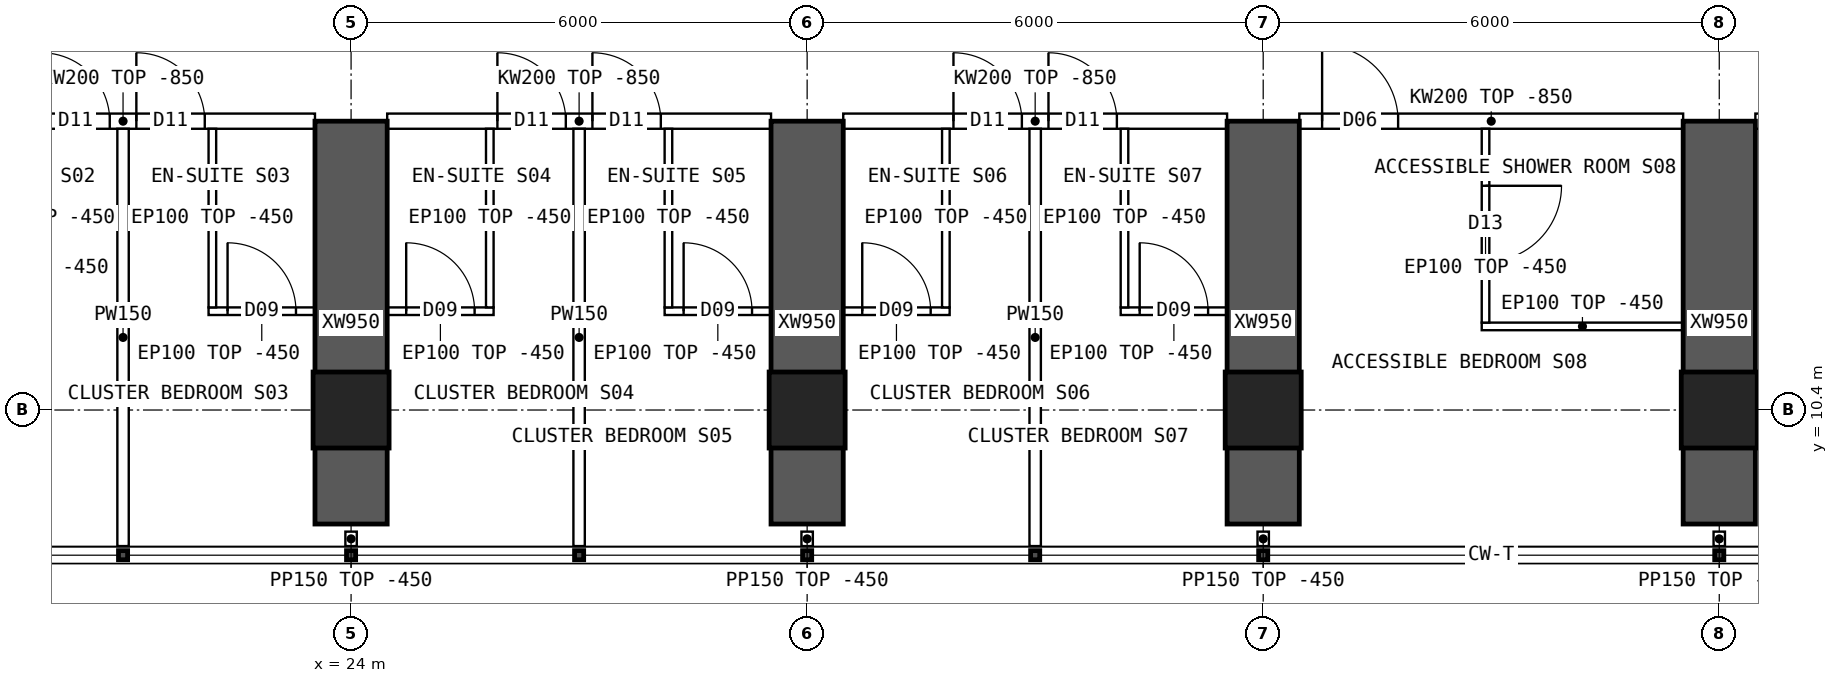
"""IFC4 building model, lengths in metres.
Left out: names, types, materials, properties, quantities, classifications, styles, units other than length and angle.
Written with IfcOpenShell. Run it as: python <this file> out.ifc"""

import sys

from ifc_helpers import new_model, si_unit, direction, frame, frame_2d, origin, origin_2d, place, context, subcontext, project, spatial, polyline, rectangle, hollow_rectangle, outline, extrude, element, fill, save


model = new_model("IFC4")
c1 = context("Model", 3, precision=1e-05, world=origin(), true_north=direction((0.0, 1.0)))
c2 = subcontext(c1, "Body", "Model", "MODEL_VIEW")
j1 = project(units=[si_unit("LENGTHUNIT", "METRE"), si_unit("PLANEANGLEUNIT", "RADIAN")], contexts=[c1])
p1 = place(None, origin())
s1 = spatial("IfcSite", under=j1, at=p1, CompositionType="ELEMENT")
p2 = place(p1, origin())
s2 = spatial("IfcBuilding", under=s1, at=p2, CompositionType="ELEMENT")
p3 = place(p2, frame((0.0, 0.0, 80.65)))
s3 = spatial("IfcBuildingStorey", under=s2, at=p3, CompositionType="ELEMENT", Elevation=80.65)
for number, where, z_axis, x_axis in (
    (1, (24.0, 10.4, 0.0), (0.0, 0.0, 1.0), (1.0, 0.0, 0.0)),
    (2, (30.0, 10.4, 0.0), (0.0, 0.0, 1.0), (1.0, 0.0, 0.0)),
    (3, (36.0, 10.4, 0.0), (0.0, 0.0, 1.0), (1.0, 0.0, 0.0)),
    (4, (42.0, 10.4, 0.0), (0.0, 0.0, 1.0), (1.0, 0.0, 0.0)),
):
    element("IfcColumn", number, at=place(p3, frame(where, z_axis=z_axis, x_axis=x_axis)), inside=s3, PredefinedType="COLUMN", context=c2, shape_type="SweptSolid", body=[
        extrude(hollow_rectangle(XDim=1.0, YDim=1.0, WallThickness=0.1, at=origin_2d()), origin(), (0.0, 0.0, 1.0), 3.75),
    ])
for number, where, z_axis, x_axis in (
    (5, (24.0, 8.9, 0.0), (0.0, 0.0, 1.0), (0.0, 1.0, 0.0)),
    (6, (30.0, 8.9, 0.0), (0.0, 0.0, 1.0), (0.0, 1.0, 0.0)),
    (7, (36.0, 8.9, 0.0), (0.0, 0.0, 1.0), (0.0, 1.0, 0.0)),
    (8, (42.0, 8.9, 0.0), (0.0, 0.0, 1.0), (0.0, 1.0, 0.0)),
):
    element("IfcWall", number, at=place(p3, frame(where, z_axis=z_axis, x_axis=x_axis)), inside=s3, PredefinedType="SHEAR", context=c2, shape_type="SweptSolid", body=[
        extrude(rectangle(XDim=5.3, YDim=0.95, at=frame_2d((2.65, 0.0))), origin(), (0.0, 0.0, 1.0), 3.75),
    ])
p4 = place(p3, frame((18.475, 14.2, 0.0), z_axis=(0.0, 0.0, 1.0), x_axis=(1.0, 0.0, 0.0)))
e9 = element("IfcWall", 9, at=p4, inside=s3, PredefinedType="SOLIDWALL", context=c2, shape_type="SweptSolid", body=[
    extrude(outline(polyline([(0.0, 0.0), (5.05, 0.0), (5.05, 2.9), (0.0, 2.9), (0.0, 0.0)])), frame((0.0, 0.1, 0.0), z_axis=(0.0, -1.0, 0.0), x_axis=(1.0, 0.0, 0.0)), (0.0, 0.0, 1.0), 0.2),
])
p5 = place(p4, frame((1.45, 0.0, 0.0)))
e10 = element("IfcOpeningElement", 10, at=p5, cuts=e9, PredefinedType="OPENING", context=c2, shape_type="SweptSolid", body=[
    extrude(rectangle(XDim=0.9, YDim=2.1, at=frame_2d((0.45, 1.05))), frame((0.0, 0.11, 0.0), z_axis=(0.0, -1.0, 0.0), x_axis=(1.0, 0.0, 0.0)), (0.0, 0.0, 1.0), 0.22),
])
p6 = place(p4, frame((2.7, 0.0, 0.0)))
e11 = element("IfcOpeningElement", 11, at=p6, cuts=e9, PredefinedType="OPENING", context=c2, shape_type="SweptSolid", body=[
    extrude(rectangle(XDim=0.9, YDim=2.1, at=frame_2d((0.45, 1.05))), frame((0.0, 0.11, 0.0), z_axis=(0.0, -1.0, 0.0), x_axis=(1.0, 0.0, 0.0)), (0.0, 0.0, 1.0), 0.22),
])
p7 = place(p3, frame((24.475, 14.2, 0.0), z_axis=(0.0, 0.0, 1.0), x_axis=(1.0, 0.0, 0.0)))
e12 = element("IfcWall", 12, at=p7, inside=s3, PredefinedType="SOLIDWALL", context=c2, shape_type="SweptSolid", body=[
    extrude(outline(polyline([(0.0, 0.0), (5.05, 0.0), (5.05, 2.9), (0.0, 2.9), (0.0, 0.0)])), frame((0.0, 0.1, 0.0), z_axis=(0.0, -1.0, 0.0), x_axis=(1.0, 0.0, 0.0)), (0.0, 0.0, 1.0), 0.2),
])
p8 = place(p7, frame((1.45, 0.0, 0.0)))
e13 = element("IfcOpeningElement", 13, at=p8, cuts=e12, PredefinedType="OPENING", context=c2, shape_type="SweptSolid", body=[
    extrude(rectangle(XDim=0.9, YDim=2.1, at=frame_2d((0.45, 1.05))), frame((0.0, 0.11, 0.0), z_axis=(0.0, -1.0, 0.0), x_axis=(1.0, 0.0, 0.0)), (0.0, 0.0, 1.0), 0.22),
])
p9 = place(p7, frame((2.7, 0.0, 0.0)))
e14 = element("IfcOpeningElement", 14, at=p9, cuts=e12, PredefinedType="OPENING", context=c2, shape_type="SweptSolid", body=[
    extrude(rectangle(XDim=0.9, YDim=2.1, at=frame_2d((0.45, 1.05))), frame((0.0, 0.11, 0.0), z_axis=(0.0, -1.0, 0.0), x_axis=(1.0, 0.0, 0.0)), (0.0, 0.0, 1.0), 0.22),
])
p10 = place(p3, frame((30.475, 14.2, 0.0), z_axis=(0.0, 0.0, 1.0), x_axis=(1.0, 0.0, 0.0)))
e15 = element("IfcWall", 15, at=p10, inside=s3, PredefinedType="SOLIDWALL", context=c2, shape_type="SweptSolid", body=[
    extrude(outline(polyline([(0.0, 0.0), (5.05, 0.0), (5.05, 2.9), (0.0, 2.9), (0.0, 0.0)])), frame((0.0, 0.1, 0.0), z_axis=(0.0, -1.0, 0.0), x_axis=(1.0, 0.0, 0.0)), (0.0, 0.0, 1.0), 0.2),
])
p11 = place(p10, frame((1.45, 0.0, 0.0)))
e16 = element("IfcOpeningElement", 16, at=p11, cuts=e15, PredefinedType="OPENING", context=c2, shape_type="SweptSolid", body=[
    extrude(rectangle(XDim=0.9, YDim=2.1, at=frame_2d((0.45, 1.05))), frame((0.0, 0.11, 0.0), z_axis=(0.0, -1.0, 0.0), x_axis=(1.0, 0.0, 0.0)), (0.0, 0.0, 1.0), 0.22),
])
p12 = place(p10, frame((2.7, 0.0, 0.0)))
e17 = element("IfcOpeningElement", 17, at=p12, cuts=e15, PredefinedType="OPENING", context=c2, shape_type="SweptSolid", body=[
    extrude(rectangle(XDim=0.9, YDim=2.1, at=frame_2d((0.45, 1.05))), frame((0.0, 0.11, 0.0), z_axis=(0.0, -1.0, 0.0), x_axis=(1.0, 0.0, 0.0)), (0.0, 0.0, 1.0), 0.22),
])
p13 = place(p3, frame((36.475, 14.2, 0.0), z_axis=(0.0, 0.0, 1.0), x_axis=(1.0, 0.0, 0.0)))
e18 = element("IfcWall", 18, at=p13, inside=s3, PredefinedType="SOLIDWALL", context=c2, shape_type="SweptSolid", body=[
    extrude(outline(polyline([(0.0, 0.0), (5.05, 0.0), (5.05, 2.9), (0.0, 2.9), (0.0, 0.0)])), frame((0.0, 0.1, 0.0), z_axis=(0.0, -1.0, 0.0), x_axis=(1.0, 0.0, 0.0)), (0.0, 0.0, 1.0), 0.2),
])
p14 = place(p13, frame((0.3, 0.0, 0.0)))
e19 = element("IfcOpeningElement", 19, at=p14, cuts=e18, PredefinedType="OPENING", context=c2, shape_type="SweptSolid", body=[
    extrude(rectangle(XDim=1.0, YDim=2.1, at=frame_2d((0.5, 1.05))), frame((0.0, 0.11, 0.0), z_axis=(0.0, -1.0, 0.0), x_axis=(1.0, 0.0, 0.0)), (0.0, 0.0, 1.0), 0.22),
])
p15 = place(p3, frame((42.475, 14.2, 0.0), z_axis=(0.0, 0.0, 1.0), x_axis=(1.0, 0.0, 0.0)))
e20 = element("IfcWall", 20, at=p15, inside=s3, PredefinedType="SOLIDWALL", context=c2, shape_type="SweptSolid", body=[
    extrude(outline(polyline([(0.0, 0.0), (5.05, 0.0), (5.05, 2.9), (0.0, 2.9), (0.0, 0.0)])), frame((0.0, 0.1, 0.0), z_axis=(0.0, -1.0, 0.0), x_axis=(1.0, 0.0, 0.0)), (0.0, 0.0, 1.0), 0.2),
])
p16 = place(p15, frame((0.6, 0.0, 0.0)))
e21 = element("IfcOpeningElement", 21, at=p16, cuts=e20, PredefinedType="OPENING", context=c2, shape_type="SweptSolid", body=[
    extrude(rectangle(XDim=1.0, YDim=2.1, at=frame_2d((0.5, 1.05))), frame((0.0, 0.11, 0.0), z_axis=(0.0, -1.0, 0.0), x_axis=(1.0, 0.0, 0.0)), (0.0, 0.0, 1.0), 0.22),
])
p17 = place(p3, frame((21.0, 8.61, 0.0), z_axis=(0.0, 0.0, 1.0), x_axis=(0.0, 1.0, 0.0)))
e22 = element("IfcWall", 22, at=p17, inside=s3, PredefinedType="PARTITIONING", context=c2, shape_type="SweptSolid", body=[
    extrude(outline(polyline([(0.0, 0.0), (5.49, 0.0), (5.49, 2.9), (5.442, 2.9), (5.44, 3.3), (1.992, 3.3), (1.99, 2.9), (1.592, 2.9), (1.59, 3.3), (0.0, 3.3), (0.0, 0.0)])), frame((0.0, 0.075, 0.0), z_axis=(0.0, -1.0, 0.0), x_axis=(1.0, 0.0, 0.0)), (0.0, 0.0, 1.0), 0.15),
])
p18 = place(p3, frame((23.525, 11.7, 0.0), z_axis=(0.0, 0.0, 1.0), x_axis=(-1.0, 0.0, 0.0)))
e23 = element("IfcWall", 23, at=p18, inside=s3, PredefinedType="PARTITIONING", context=c2, shape_type="SweptSolid", body=[
    extrude(rectangle(XDim=1.4, YDim=0.1, at=frame_2d((0.7, 0.0))), origin(), (0.0, 0.0, 1.0), 3.3),
])
p19 = place(p18, frame((0.25, 0.0, 0.0)))
e24 = element("IfcOpeningElement", 24, at=p19, cuts=e23, PredefinedType="OPENING", context=c2, shape_type="SweptSolid", body=[
    extrude(rectangle(XDim=0.9, YDim=2.1, at=frame_2d((0.45, 1.05))), frame((0.0, 0.06, 0.0), z_axis=(0.0, -1.0, 0.0), x_axis=(1.0, 0.0, 0.0)), (0.0, 0.0, 1.0), 0.12),
])
p20 = place(p3, frame((22.175, 11.75, 0.0), z_axis=(0.0, 0.0, 1.0), x_axis=(0.0, 1.0, 0.0)))
e25 = element("IfcWall", 25, at=p20, inside=s3, PredefinedType="PARTITIONING", context=c2, shape_type="SweptSolid", body=[
    extrude(outline(polyline([(0.0, 0.0), (2.35, 0.0), (2.35, 2.9), (2.302, 2.9), (2.3, 3.3), (0.0, 3.3), (0.0, 0.0)])), frame((0.0, 0.05, 0.0), z_axis=(0.0, -1.0, 0.0), x_axis=(1.0, 0.0, 0.0)), (0.0, 0.0, 1.0), 0.1),
])
p21 = place(p3, frame((27.0, 8.61, 0.0), z_axis=(0.0, 0.0, 1.0), x_axis=(0.0, 1.0, 0.0)))
e26 = element("IfcWall", 26, at=p21, inside=s3, PredefinedType="PARTITIONING", context=c2, shape_type="SweptSolid", body=[
    extrude(outline(polyline([(0.0, 0.0), (5.49, 0.0), (5.49, 2.9), (5.442, 2.9), (5.44, 3.3), (1.992, 3.3), (1.99, 2.9), (1.592, 2.9), (1.59, 3.3), (0.0, 3.3), (0.0, 0.0)])), frame((0.0, 0.075, 0.0), z_axis=(0.0, -1.0, 0.0), x_axis=(1.0, 0.0, 0.0)), (0.0, 0.0, 1.0), 0.15),
])
p22 = place(p3, frame((25.875, 11.7, 0.0), z_axis=(0.0, 0.0, 1.0), x_axis=(-1.0, 0.0, 0.0)))
e27 = element("IfcWall", 27, at=p22, inside=s3, PredefinedType="PARTITIONING", context=c2, shape_type="SweptSolid", body=[
    extrude(rectangle(XDim=1.4, YDim=0.1, at=frame_2d((0.7, 0.0))), origin(), (0.0, 0.0, 1.0), 3.3),
])
p23 = place(p22, frame((0.25, 0.0, 0.0)))
e28 = element("IfcOpeningElement", 28, at=p23, cuts=e27, PredefinedType="OPENING", context=c2, shape_type="SweptSolid", body=[
    extrude(rectangle(XDim=0.9, YDim=2.1, at=frame_2d((0.45, 1.05))), frame((0.0, 0.06, 0.0), z_axis=(0.0, -1.0, 0.0), x_axis=(1.0, 0.0, 0.0)), (0.0, 0.0, 1.0), 0.12),
])
p24 = place(p3, frame((25.825, 11.75, 0.0), z_axis=(0.0, 0.0, 1.0), x_axis=(0.0, 1.0, 0.0)))
e29 = element("IfcWall", 29, at=p24, inside=s3, PredefinedType="PARTITIONING", context=c2, shape_type="SweptSolid", body=[
    extrude(outline(polyline([(0.0, 0.0), (2.35, 0.0), (2.35, 2.9), (2.302, 2.9), (2.3, 3.3), (0.0, 3.3), (0.0, 0.0)])), frame((0.0, 0.05, 0.0), z_axis=(0.0, -1.0, 0.0), x_axis=(1.0, 0.0, 0.0)), (0.0, 0.0, 1.0), 0.1),
])
p25 = place(p3, frame((29.525, 11.7, 0.0), z_axis=(0.0, 0.0, 1.0), x_axis=(-1.0, 0.0, 0.0)))
e30 = element("IfcWall", 30, at=p25, inside=s3, PredefinedType="PARTITIONING", context=c2, shape_type="SweptSolid", body=[
    extrude(rectangle(XDim=1.4, YDim=0.1, at=frame_2d((0.7, 0.0))), origin(), (0.0, 0.0, 1.0), 3.3),
])
p26 = place(p25, frame((0.25, 0.0, 0.0)))
e31 = element("IfcOpeningElement", 31, at=p26, cuts=e30, PredefinedType="OPENING", context=c2, shape_type="SweptSolid", body=[
    extrude(rectangle(XDim=0.9, YDim=2.1, at=frame_2d((0.45, 1.05))), frame((0.0, 0.06, 0.0), z_axis=(0.0, -1.0, 0.0), x_axis=(1.0, 0.0, 0.0)), (0.0, 0.0, 1.0), 0.12),
])
p27 = place(p3, frame((28.175, 11.75, 0.0), z_axis=(0.0, 0.0, 1.0), x_axis=(0.0, 1.0, 0.0)))
e32 = element("IfcWall", 32, at=p27, inside=s3, PredefinedType="PARTITIONING", context=c2, shape_type="SweptSolid", body=[
    extrude(outline(polyline([(0.0, 0.0), (2.35, 0.0), (2.35, 2.9), (2.302, 2.9), (2.3, 3.3), (0.0, 3.3), (0.0, 0.0)])), frame((0.0, 0.05, 0.0), z_axis=(0.0, -1.0, 0.0), x_axis=(1.0, 0.0, 0.0)), (0.0, 0.0, 1.0), 0.1),
])
p28 = place(p3, frame((33.0, 8.61, 0.0), z_axis=(0.0, 0.0, 1.0), x_axis=(0.0, 1.0, 0.0)))
e33 = element("IfcWall", 33, at=p28, inside=s3, PredefinedType="PARTITIONING", context=c2, shape_type="SweptSolid", body=[
    extrude(outline(polyline([(0.0, 0.0), (5.49, 0.0), (5.49, 2.9), (5.442, 2.9), (5.44, 3.3), (1.992, 3.3), (1.99, 2.9), (1.592, 2.9), (1.59, 3.3), (0.0, 3.3), (0.0, 0.0)])), frame((0.0, 0.075, 0.0), z_axis=(0.0, -1.0, 0.0), x_axis=(1.0, 0.0, 0.0)), (0.0, 0.0, 1.0), 0.15),
])
p29 = place(p3, frame((31.875, 11.7, 0.0), z_axis=(0.0, 0.0, 1.0), x_axis=(-1.0, 0.0, 0.0)))
e34 = element("IfcWall", 34, at=p29, inside=s3, PredefinedType="PARTITIONING", context=c2, shape_type="SweptSolid", body=[
    extrude(rectangle(XDim=1.4, YDim=0.1, at=frame_2d((0.7, 0.0))), origin(), (0.0, 0.0, 1.0), 3.3),
])
p30 = place(p29, frame((0.25, 0.0, 0.0)))
e35 = element("IfcOpeningElement", 35, at=p30, cuts=e34, PredefinedType="OPENING", context=c2, shape_type="SweptSolid", body=[
    extrude(rectangle(XDim=0.9, YDim=2.1, at=frame_2d((0.45, 1.05))), frame((0.0, 0.06, 0.0), z_axis=(0.0, -1.0, 0.0), x_axis=(1.0, 0.0, 0.0)), (0.0, 0.0, 1.0), 0.12),
])
p31 = place(p3, frame((31.825, 11.75, 0.0), z_axis=(0.0, 0.0, 1.0), x_axis=(0.0, 1.0, 0.0)))
e36 = element("IfcWall", 36, at=p31, inside=s3, PredefinedType="PARTITIONING", context=c2, shape_type="SweptSolid", body=[
    extrude(outline(polyline([(0.0, 0.0), (2.35, 0.0), (2.35, 2.9), (2.302, 2.9), (2.3, 3.3), (0.0, 3.3), (0.0, 0.0)])), frame((0.0, 0.05, 0.0), z_axis=(0.0, -1.0, 0.0), x_axis=(1.0, 0.0, 0.0)), (0.0, 0.0, 1.0), 0.1),
])
p32 = place(p3, frame((35.525, 11.7, 0.0), z_axis=(0.0, 0.0, 1.0), x_axis=(-1.0, 0.0, 0.0)))
e37 = element("IfcWall", 37, at=p32, inside=s3, PredefinedType="PARTITIONING", context=c2, shape_type="SweptSolid", body=[
    extrude(rectangle(XDim=1.4, YDim=0.1, at=frame_2d((0.7, 0.0))), origin(), (0.0, 0.0, 1.0), 3.3),
])
p33 = place(p32, frame((0.25, 0.0, 0.0)))
e38 = element("IfcOpeningElement", 38, at=p33, cuts=e37, PredefinedType="OPENING", context=c2, shape_type="SweptSolid", body=[
    extrude(rectangle(XDim=0.9, YDim=2.1, at=frame_2d((0.45, 1.05))), frame((0.0, 0.06, 0.0), z_axis=(0.0, -1.0, 0.0), x_axis=(1.0, 0.0, 0.0)), (0.0, 0.0, 1.0), 0.12),
])
p34 = place(p3, frame((34.175, 11.75, 0.0), z_axis=(0.0, 0.0, 1.0), x_axis=(0.0, 1.0, 0.0)))
e39 = element("IfcWall", 39, at=p34, inside=s3, PredefinedType="PARTITIONING", context=c2, shape_type="SweptSolid", body=[
    extrude(outline(polyline([(0.0, 0.0), (2.35, 0.0), (2.35, 2.9), (2.302, 2.9), (2.3, 3.3), (0.0, 3.3), (0.0, 0.0)])), frame((0.0, 0.05, 0.0), z_axis=(0.0, -1.0, 0.0), x_axis=(1.0, 0.0, 0.0)), (0.0, 0.0, 1.0), 0.1),
])
p35 = place(p3, frame((38.875, 11.5, 0.0), z_axis=(0.0, 0.0, 1.0), x_axis=(1.0, 0.0, 0.0)))
e40 = element("IfcWall", 40, at=p35, inside=s3, PredefinedType="PARTITIONING", context=c2, shape_type="SweptSolid", body=[
    extrude(rectangle(XDim=2.65, YDim=0.1, at=frame_2d((1.325, 0.0))), origin(), (0.0, 0.0, 1.0), 3.3),
])
p36 = place(p3, frame((38.925, 11.55, 0.0), z_axis=(0.0, 0.0, 1.0), x_axis=(0.0, 1.0, 0.0)))
e41 = element("IfcWall", 41, at=p36, inside=s3, PredefinedType="PARTITIONING", context=c2, shape_type="SweptSolid", body=[
    extrude(outline(polyline([(0.0, 0.0), (2.55, 0.0), (2.55, 2.9), (2.502, 2.9), (2.5, 3.3), (0.0, 3.3), (0.0, 0.0)])), frame((0.0, 0.05, 0.0), z_axis=(0.0, -1.0, 0.0), x_axis=(1.0, 0.0, 0.0)), (0.0, 0.0, 1.0), 0.1),
])
p37 = place(p36, frame((0.8, 0.0, 0.0)))
e42 = element("IfcOpeningElement", 42, at=p37, cuts=e41, PredefinedType="OPENING", context=c2, shape_type="SweptSolid", body=[
    extrude(rectangle(XDim=1.0, YDim=2.1, at=frame_2d((0.5, 1.05))), frame((0.0, 0.06, 0.0), z_axis=(0.0, -1.0, 0.0), x_axis=(1.0, 0.0, 0.0)), (0.0, 0.0, 1.0), 0.12),
])
for number, where, z_axis, x_axis in (
    (43, (24.0, 8.8, 0.0), (0.0, 0.0, 1.0), (0.0, -1.0, 0.0)),
    (44, (30.0, 8.8, 0.0), (0.0, 0.0, 1.0), (0.0, -1.0, 0.0)),
    (45, (36.0, 8.8, 0.0), (0.0, 0.0, 1.0), (0.0, -1.0, 0.0)),
    (46, (42.0, 8.8, 0.0), (0.0, 0.0, 1.0), (0.0, -1.0, 0.0)),
):
    element("IfcWall", number, at=place(p3, frame(where, z_axis=z_axis, x_axis=x_axis)), inside=s3, PredefinedType="PARTITIONING", context=c2, shape_type="SweptSolid", body=[
        extrude(rectangle(XDim=0.19, YDim=0.15, at=frame_2d((0.095, 0.0))), origin(), (0.0, 0.0, 1.0), 3.3),
    ])
p38 = place(p5, origin())
e47 = element("IfcDoor", 47, at=p38, inside=s3, OperationType="SINGLE_SWING_LEFT", PredefinedType="DOOR", context=c2, shape_type="SweptSolid", body=[
    extrude(rectangle(XDim=0.9, YDim=2.1, at=frame_2d((0.45, 1.05))), frame((0.0, 0.025, 0.0), z_axis=(0.0, -1.0, 0.0), x_axis=(1.0, 0.0, 0.0)), (0.0, 0.0, 1.0), 0.05),
])
fill(e10, e47)
p39 = place(p19, origin())
e48 = element("IfcDoor", 48, at=p39, inside=s3, OperationType="SINGLE_SWING_RIGHT", PredefinedType="DOOR", context=c2, shape_type="SweptSolid", body=[
    extrude(rectangle(XDim=0.9, YDim=2.1, at=frame_2d((0.45, 1.05))), frame((0.0, 0.025, 0.0), z_axis=(0.0, -1.0, 0.0), x_axis=(1.0, 0.0, 0.0)), (0.0, 0.0, 1.0), 0.05),
])
fill(e24, e48)
p40 = place(p6, origin())
e49 = element("IfcDoor", 49, at=p40, inside=s3, OperationType="SINGLE_SWING_LEFT", PredefinedType="DOOR", context=c2, shape_type="SweptSolid", body=[
    extrude(rectangle(XDim=0.9, YDim=2.1, at=frame_2d((0.45, 1.05))), frame((0.0, 0.025, 0.0), z_axis=(0.0, -1.0, 0.0), x_axis=(1.0, 0.0, 0.0)), (0.0, 0.0, 1.0), 0.05),
])
fill(e11, e49)
p41 = place(p23, origin())
e50 = element("IfcDoor", 50, at=p41, inside=s3, OperationType="SINGLE_SWING_RIGHT", PredefinedType="DOOR", context=c2, shape_type="SweptSolid", body=[
    extrude(rectangle(XDim=0.9, YDim=2.1, at=frame_2d((0.45, 1.05))), frame((0.0, 0.025, 0.0), z_axis=(0.0, -1.0, 0.0), x_axis=(1.0, 0.0, 0.0)), (0.0, 0.0, 1.0), 0.05),
])
fill(e28, e50)
p42 = place(p8, origin())
e51 = element("IfcDoor", 51, at=p42, inside=s3, OperationType="SINGLE_SWING_LEFT", PredefinedType="DOOR", context=c2, shape_type="SweptSolid", body=[
    extrude(rectangle(XDim=0.9, YDim=2.1, at=frame_2d((0.45, 1.05))), frame((0.0, 0.025, 0.0), z_axis=(0.0, -1.0, 0.0), x_axis=(1.0, 0.0, 0.0)), (0.0, 0.0, 1.0), 0.05),
])
fill(e13, e51)
p43 = place(p26, origin())
e52 = element("IfcDoor", 52, at=p43, inside=s3, OperationType="SINGLE_SWING_RIGHT", PredefinedType="DOOR", context=c2, shape_type="SweptSolid", body=[
    extrude(rectangle(XDim=0.9, YDim=2.1, at=frame_2d((0.45, 1.05))), frame((0.0, 0.025, 0.0), z_axis=(0.0, -1.0, 0.0), x_axis=(1.0, 0.0, 0.0)), (0.0, 0.0, 1.0), 0.05),
])
fill(e31, e52)
p44 = place(p9, origin())
e53 = element("IfcDoor", 53, at=p44, inside=s3, OperationType="SINGLE_SWING_LEFT", PredefinedType="DOOR", context=c2, shape_type="SweptSolid", body=[
    extrude(rectangle(XDim=0.9, YDim=2.1, at=frame_2d((0.45, 1.05))), frame((0.0, 0.025, 0.0), z_axis=(0.0, -1.0, 0.0), x_axis=(1.0, 0.0, 0.0)), (0.0, 0.0, 1.0), 0.05),
])
fill(e14, e53)
p45 = place(p30, origin())
e54 = element("IfcDoor", 54, at=p45, inside=s3, OperationType="SINGLE_SWING_RIGHT", PredefinedType="DOOR", context=c2, shape_type="SweptSolid", body=[
    extrude(rectangle(XDim=0.9, YDim=2.1, at=frame_2d((0.45, 1.05))), frame((0.0, 0.025, 0.0), z_axis=(0.0, -1.0, 0.0), x_axis=(1.0, 0.0, 0.0)), (0.0, 0.0, 1.0), 0.05),
])
fill(e35, e54)
p46 = place(p11, origin())
e55 = element("IfcDoor", 55, at=p46, inside=s3, OperationType="SINGLE_SWING_LEFT", PredefinedType="DOOR", context=c2, shape_type="SweptSolid", body=[
    extrude(rectangle(XDim=0.9, YDim=2.1, at=frame_2d((0.45, 1.05))), frame((0.0, 0.025, 0.0), z_axis=(0.0, -1.0, 0.0), x_axis=(1.0, 0.0, 0.0)), (0.0, 0.0, 1.0), 0.05),
])
fill(e16, e55)
p47 = place(p33, origin())
e56 = element("IfcDoor", 56, at=p47, inside=s3, OperationType="SINGLE_SWING_RIGHT", PredefinedType="DOOR", context=c2, shape_type="SweptSolid", body=[
    extrude(rectangle(XDim=0.9, YDim=2.1, at=frame_2d((0.45, 1.05))), frame((0.0, 0.025, 0.0), z_axis=(0.0, -1.0, 0.0), x_axis=(1.0, 0.0, 0.0)), (0.0, 0.0, 1.0), 0.05),
])
fill(e38, e56)
p48 = place(p12, origin())
e57 = element("IfcDoor", 57, at=p48, inside=s3, OperationType="SINGLE_SWING_LEFT", PredefinedType="DOOR", context=c2, shape_type="SweptSolid", body=[
    extrude(rectangle(XDim=0.9, YDim=2.1, at=frame_2d((0.45, 1.05))), frame((0.0, 0.025, 0.0), z_axis=(0.0, -1.0, 0.0), x_axis=(1.0, 0.0, 0.0)), (0.0, 0.0, 1.0), 0.05),
])
fill(e17, e57)
p49 = place(p37, origin())
e58 = element("IfcDoor", 58, at=p49, inside=s3, OperationType="SINGLE_SWING_RIGHT", PredefinedType="DOOR", context=c2, shape_type="SweptSolid", body=[
    extrude(rectangle(XDim=1.0, YDim=2.1, at=frame_2d((0.5, 1.05))), frame((0.0, 0.025, 0.0), z_axis=(0.0, -1.0, 0.0), x_axis=(1.0, 0.0, 0.0)), (0.0, 0.0, 1.0), 0.05),
])
fill(e42, e58)
p50 = place(p14, origin())
e59 = element("IfcDoor", 59, at=p50, inside=s3, OperationType="SINGLE_SWING_LEFT", PredefinedType="DOOR", context=c2, shape_type="SweptSolid", body=[
    extrude(rectangle(XDim=1.0, YDim=2.1, at=frame_2d((0.5, 1.05))), frame((0.0, 0.025, 0.0), z_axis=(0.0, -1.0, 0.0), x_axis=(1.0, 0.0, 0.0)), (0.0, 0.0, 1.0), 0.05),
])
fill(e19, e59)
save(model, sys.argv[1])
